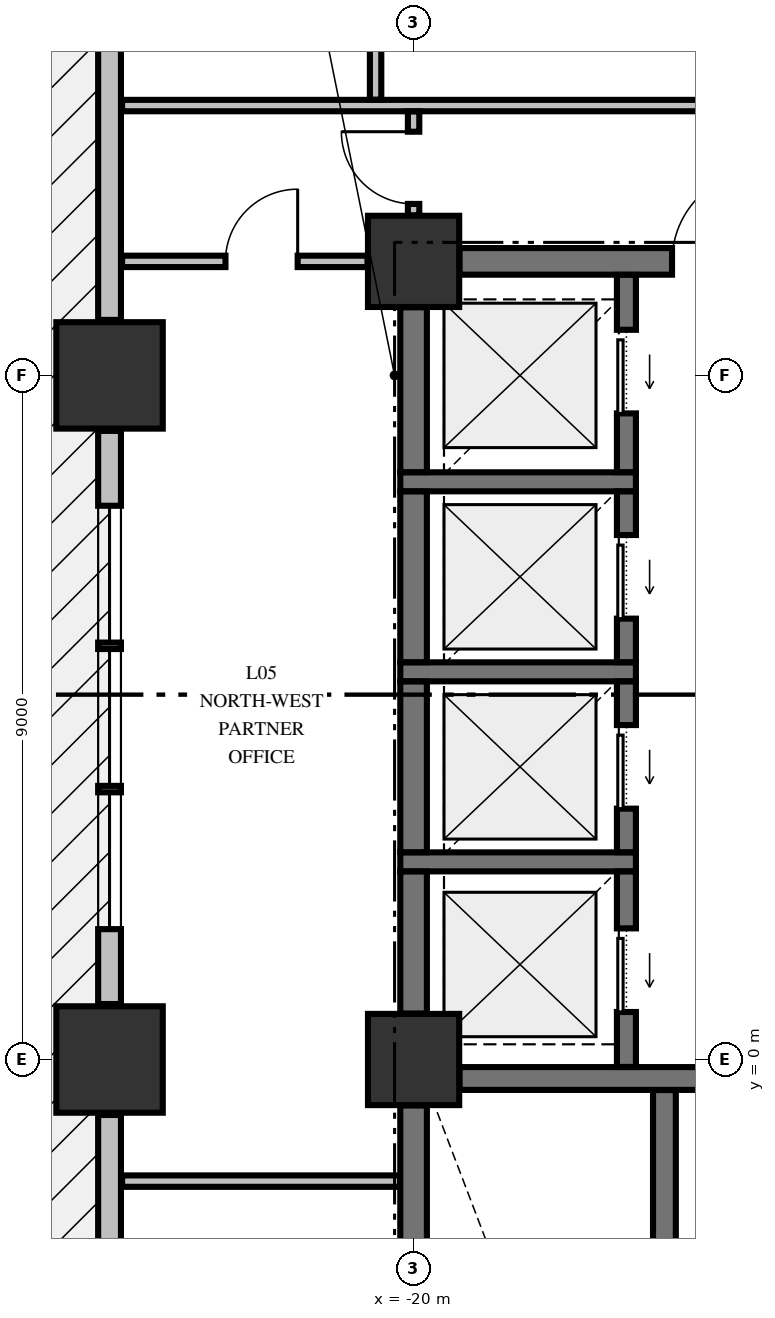
"""IFC4 building model, lengths in metres.
Left out: names, types, materials, properties, quantities, classifications, styles, units other than length and angle.
Written with IfcOpenShell. Run it as: python <this file> out.ifc"""

import sys

from ifc_helpers import new_model, si_unit, direction, frame, frame_2d, origin, origin_2d, place, context, subcontext, project, spatial, rectangle, extrude, element, fill, save


model = new_model("IFC4")
c1 = context("Model", 3, precision=1e-05, world=origin(), true_north=direction((0.0, 1.0)))
c2 = subcontext(c1, "Body", "Model", "MODEL_VIEW")
j1 = project(units=[si_unit("LENGTHUNIT", "METRE"), si_unit("PLANEANGLEUNIT", "RADIAN")], contexts=[c1])
p1 = place(None, origin())
s1 = spatial("IfcSite", under=j1, at=p1, CompositionType="ELEMENT")
p2 = place(p1, origin())
s2 = spatial("IfcBuilding", under=s1, at=p2, CompositionType="ELEMENT")
p3 = place(p2, frame((0.0, 0.0, 27.2)))
s3 = spatial("IfcBuildingStorey", under=s2, at=p3, CompositionType="ELEMENT", Elevation=27.2)
for number, where, z_axis, x_axis in (
    (1, (-24.0, 0.0, -0.45), (0.0, 0.0, 1.0), (1.0, 0.0, 0.0)),
    (2, (-24.0, 9.0, -0.45), (0.0, 0.0, 1.0), (1.0, 0.0, 0.0)),
):
    element("IfcColumn", number, at=place(p3, frame(where, z_axis=z_axis, x_axis=x_axis)), inside=s3, PredefinedType="COLUMN", context=c2, shape_type="SweptSolid", body=[
        extrude(rectangle(XDim=1.4, YDim=1.4, at=origin_2d()), origin(), (0.0, 0.0, 1.0), 3.77),
    ])
for number, where, z_axis, x_axis in (
    (3, (-20.0, 10.5, -0.45), (0.0, 0.0, 1.0), (1.0, 0.0, 0.0)),
    (4, (-20.0, 0.0, -0.45), (0.0, 0.0, 1.0), (1.0, 0.0, 0.0)),
):
    element("IfcColumn", number, at=place(p3, frame(where, z_axis=z_axis, x_axis=x_axis)), inside=s3, PredefinedType="COLUMN", context=c2, shape_type="SweptSolid", body=[
        extrude(rectangle(XDim=1.2, YDim=1.2, at=origin_2d()), origin(), (0.0, 0.0, 1.0), 3.77),
    ])
p4 = place(p3, frame((-24.0, -0.73, 0.0), z_axis=(0.0, 0.0, 1.0), x_axis=(0.0, -1.0, 0.0)))
e5 = element("IfcWall", 5, at=p4, inside=s3, PredefinedType="STANDARD", context=c2, shape_type="SweptSolid", body=[
    extrude(rectangle(XDim=7.54, YDim=0.3, at=frame_2d((3.77, 0.0))), origin(), (0.0, 0.0, 1.0), 2.712),
])
p5 = place(p4, frame((2.87, 0.0, 0.78)))
e6 = element("IfcOpeningElement", 6, at=p5, cuts=e5, PredefinedType="OPENING", context=c2, shape_type="SweptSolid", body=[
    extrude(rectangle(XDim=1.8, YDim=1.72, at=frame_2d((0.9, 0.86))), frame((0.0, 0.16, 0.0), z_axis=(0.0, -1.0, 0.0), x_axis=(1.0, 0.0, 0.0)), (0.0, 0.0, 1.0), 0.32),
])
p6 = place(p4, frame((4.755, 0.0, 0.78)))
e7 = element("IfcOpeningElement", 7, at=p6, cuts=e5, PredefinedType="OPENING", context=c2, shape_type="SweptSolid", body=[
    extrude(rectangle(XDim=1.8, YDim=1.72, at=frame_2d((0.9, 0.86))), frame((0.0, 0.16, 0.0), z_axis=(0.0, -1.0, 0.0), x_axis=(1.0, 0.0, 0.0)), (0.0, 0.0, 1.0), 0.32),
])
p7 = place(p3, frame((-24.0, 8.27, 0.0), z_axis=(0.0, 0.0, 1.0), x_axis=(0.0, -1.0, 0.0)))
e8 = element("IfcWall", 8, at=p7, inside=s3, PredefinedType="STANDARD", context=c2, shape_type="SweptSolid", body=[
    extrude(rectangle(XDim=7.54, YDim=0.3, at=frame_2d((3.77, 0.0))), origin(), (0.0, 0.0, 1.0), 2.712),
])
p8 = place(p7, frame((0.985, 0.0, 0.78)))
e9 = element("IfcOpeningElement", 9, at=p8, cuts=e8, PredefinedType="OPENING", context=c2, shape_type="SweptSolid", body=[
    extrude(rectangle(XDim=1.8, YDim=1.72, at=frame_2d((0.9, 0.86))), frame((0.0, 0.16, 0.0), z_axis=(0.0, -1.0, 0.0), x_axis=(1.0, 0.0, 0.0)), (0.0, 0.0, 1.0), 0.32),
])
p9 = place(p7, frame((2.87, 0.0, 0.78)))
e10 = element("IfcOpeningElement", 10, at=p9, cuts=e8, PredefinedType="OPENING", context=c2, shape_type="SweptSolid", body=[
    extrude(rectangle(XDim=1.8, YDim=1.72, at=frame_2d((0.9, 0.86))), frame((0.0, 0.16, 0.0), z_axis=(0.0, -1.0, 0.0), x_axis=(1.0, 0.0, 0.0)), (0.0, 0.0, 1.0), 0.32),
])
p10 = place(p7, frame((4.755, 0.0, 0.78)))
e11 = element("IfcOpeningElement", 11, at=p10, cuts=e8, PredefinedType="OPENING", context=c2, shape_type="SweptSolid", body=[
    extrude(rectangle(XDim=1.8, YDim=1.72, at=frame_2d((0.9, 0.86))), frame((0.0, 0.16, 0.0), z_axis=(0.0, -1.0, 0.0), x_axis=(1.0, 0.0, 0.0)), (0.0, 0.0, 1.0), 0.32),
])
p11 = place(p3, frame((-24.0, 22.27, 0.0), z_axis=(0.0, 0.0, 1.0), x_axis=(0.0, -1.0, 0.0)))
e12 = element("IfcWall", 12, at=p11, inside=s3, PredefinedType="STANDARD", context=c2, shape_type="SweptSolid", body=[
    extrude(rectangle(XDim=12.54, YDim=0.3, at=frame_2d((6.27, 0.0))), origin(), (0.0, 0.0, 1.0), 2.712),
])
p12 = place(p3, frame((-19.396, -0.25, 0.0), z_axis=(0.0, 0.0, 1.0), x_axis=(1.0, 0.0, 0.0)))
e13 = element("IfcWall", 13, at=p12, inside=s3, PredefinedType="SHEAR", context=c2, shape_type="SweptSolid", body=[
    extrude(rectangle(XDim=7.792, YDim=0.3, at=frame_2d((3.896, 0.0))), origin(), (0.0, 0.0, 1.0), 3.32),
])
p13 = place(p12, frame((5.696, 0.0, 0.0)))
e14 = element("IfcOpeningElement", 14, at=p13, cuts=e13, PredefinedType="OPENING", context=c2, shape_type="SweptSolid", body=[
    extrude(rectangle(XDim=1.1, YDim=2.15, at=frame_2d((0.55, 1.075))), frame((0.0, 0.16, 0.0), z_axis=(0.0, -1.0, 0.0), x_axis=(1.0, 0.0, 0.0)), (0.0, 0.0, 1.0), 0.32),
])
for number, where, z_axis, x_axis in (
    (15, (-20.175, 2.6, 0.0), (0.0, 0.0, 1.0), (1.0, 0.0, 0.0)),
    (16, (-20.175, 5.1, 0.0), (0.0, 0.0, 1.0), (1.0, 0.0, 0.0)),
    (17, (-20.175, 7.6, 0.0), (0.0, 0.0, 1.0), (1.0, 0.0, 0.0)),
):
    element("IfcWall", number, at=place(p3, frame(where, z_axis=z_axis, x_axis=x_axis)), inside=s3, PredefinedType="SOLIDWALL", context=c2, shape_type="SweptSolid", body=[
        extrude(rectangle(XDim=3.1, YDim=0.25, at=frame_2d((1.55, 0.0))), origin(), (0.0, 0.0, 1.0), 3.32),
    ])
p14 = place(p3, frame((-19.396, 10.5, 0.0), z_axis=(0.0, 0.0, 1.0), x_axis=(1.0, 0.0, 0.0)))
e18 = element("IfcWall", 18, at=p14, inside=s3, PredefinedType="SHEAR", context=c2, shape_type="SweptSolid", body=[
    extrude(rectangle(XDim=4.696, YDim=0.35, at=frame_2d((2.348, 0.0))), origin(), (0.0, 0.0, 1.0), 3.32),
])
p15 = place(p14, frame((2.796, 0.0, 0.0)))
e19 = element("IfcOpeningElement", 19, at=p15, cuts=e18, PredefinedType="OPENING", context=c2, shape_type="SweptSolid", body=[
    extrude(rectangle(XDim=1.2, YDim=2.15, at=frame_2d((0.6, 1.075))), frame((0.0, 0.185, 0.0), z_axis=(0.0, -1.0, 0.0), x_axis=(1.0, 0.0, 0.0)), (0.0, 0.0, 1.0), 0.37),
])
p16 = place(p3, frame((-23.835, -1.6, 0.0), z_axis=(0.0, 0.0, 1.0), x_axis=(1.0, 0.0, 0.0)))
e20 = element("IfcWall", 20, at=p16, inside=s3, PredefinedType="PARTITIONING", context=c2, shape_type="SweptSolid", body=[
    extrude(rectangle(XDim=3.657, YDim=0.15, at=frame_2d((1.829, 0.0))), origin(), (0.0, 0.0, 1.0), 3.32),
])
p17 = place(p3, frame((-23.835, 10.5, 0.0), z_axis=(0.0, 0.0, 1.0), x_axis=(1.0, 0.0, 0.0)))
e21 = element("IfcWall", 21, at=p17, inside=s3, PredefinedType="PARTITIONING", context=c2, shape_type="SweptSolid", body=[
    extrude(rectangle(XDim=3.229, YDim=0.15, at=frame_2d((1.615, 0.0))), origin(), (0.0, 0.0, 1.0), 3.32),
])
p18 = place(p17, frame((1.36, 0.0, 0.0)))
e22 = element("IfcOpeningElement", 22, at=p18, cuts=e21, PredefinedType="OPENING", context=c2, shape_type="SweptSolid", body=[
    extrude(rectangle(XDim=0.95, YDim=2.15, at=frame_2d((0.475, 1.075))), frame((0.0, 0.085, 0.0), z_axis=(0.0, -1.0, 0.0), x_axis=(1.0, 0.0, 0.0)), (0.0, 0.0, 1.0), 0.17),
])
p19 = place(p3, frame((-23.835, 12.55, 0.0), z_axis=(0.0, 0.0, 1.0), x_axis=(1.0, 0.0, 0.0)))
e23 = element("IfcWall", 23, at=p19, inside=s3, PredefinedType="PARTITIONING", context=c2, shape_type="SweptSolid", body=[
    extrude(rectangle(XDim=52.67, YDim=0.15, at=frame_2d((26.335, 0.0))), origin(), (0.0, 0.0, 1.0), 3.32),
])
p20 = place(p19, frame((9.16, 0.0, 0.0)))
e24 = element("IfcOpeningElement", 24, at=p20, cuts=e23, PredefinedType="OPENING", context=c2, shape_type="SweptSolid", body=[
    extrude(rectangle(XDim=1.05, YDim=2.15, at=frame_2d((0.525, 1.075))), frame((0.0, 0.085, 0.0), z_axis=(0.0, -1.0, 0.0), x_axis=(1.0, 0.0, 0.0)), (0.0, 0.0, 1.0), 0.17),
])
p21 = place(p19, frame((21.61, 0.0, 0.0)))
e25 = element("IfcOpeningElement", 25, at=p21, cuts=e23, PredefinedType="OPENING", context=c2, shape_type="SweptSolid", body=[
    extrude(rectangle(XDim=1.05, YDim=2.15, at=frame_2d((0.525, 1.075))), frame((0.0, 0.085, 0.0), z_axis=(0.0, -1.0, 0.0), x_axis=(1.0, 0.0, 0.0)), (0.0, 0.0, 1.0), 0.17),
])
p22 = place(p19, frame((30.06, 0.0, 0.0)))
e26 = element("IfcOpeningElement", 26, at=p22, cuts=e23, PredefinedType="OPENING", context=c2, shape_type="SweptSolid", body=[
    extrude(rectangle(XDim=1.05, YDim=2.15, at=frame_2d((0.525, 1.075))), frame((0.0, 0.085, 0.0), z_axis=(0.0, -1.0, 0.0), x_axis=(1.0, 0.0, 0.0)), (0.0, 0.0, 1.0), 0.17),
])
p23 = place(p3, frame((-20.0, -9.346, 0.0), z_axis=(0.0, 0.0, 1.0), x_axis=(0.0, 1.0, 0.0)))
e27 = element("IfcWall", 27, at=p23, inside=s3, PredefinedType="SHEAR", context=c2, shape_type="SweptSolid", body=[
    extrude(rectangle(XDim=8.742, YDim=0.35, at=frame_2d((4.371, 0.0))), origin(), (0.0, 0.0, 1.0), 3.32),
])
p24 = place(p3, frame((-20.0, 0.604, 0.0), z_axis=(0.0, 0.0, 1.0), x_axis=(0.0, 1.0, 0.0)))
e28 = element("IfcWall", 28, at=p24, inside=s3, PredefinedType="SHEAR", context=c2, shape_type="SweptSolid", body=[
    extrude(rectangle(XDim=1.869, YDim=0.35, at=frame_2d((0.935, 0.0))), origin(), (0.0, 0.0, 1.0), 3.32),
])
for number, where, z_axis, x_axis in (
    (29, (-20.0, 2.727, 0.0), (0.0, 0.0, 1.0), (0.0, 1.0, 0.0)),
    (30, (-20.0, 5.227, 0.0), (0.0, 0.0, 1.0), (0.0, 1.0, 0.0)),
):
    element("IfcWall", number, at=place(p3, frame(where, z_axis=z_axis, x_axis=x_axis)), inside=s3, PredefinedType="SHEAR", context=c2, shape_type="SweptSolid", body=[
        extrude(rectangle(XDim=2.246, YDim=0.35, at=frame_2d((1.123, 0.0))), origin(), (0.0, 0.0, 1.0), 3.32),
    ])
p25 = place(p3, frame((-20.0, 7.727, 0.0), z_axis=(0.0, 0.0, 1.0), x_axis=(0.0, 1.0, 0.0)))
e31 = element("IfcWall", 31, at=p25, inside=s3, PredefinedType="SHEAR", context=c2, shape_type="SweptSolid", body=[
    extrude(rectangle(XDim=2.169, YDim=0.35, at=frame_2d((1.084, 0.0))), origin(), (0.0, 0.0, 1.0), 3.32),
])
p26 = place(p3, frame((-17.2, -0.098, 0.0), z_axis=(0.0, 0.0, 1.0), x_axis=(0.0, 1.0, 0.0)))
e32 = element("IfcWall", 32, at=p26, inside=s3, PredefinedType="SOLIDWALL", context=c2, shape_type="SweptSolid", body=[
    extrude(rectangle(XDim=2.571, YDim=0.25, at=frame_2d((1.285, 0.0))), origin(), (0.0, 0.0, 1.0), 3.32),
])
p27 = place(p26, frame((0.723, 0.0, 0.0)))
e33 = element("IfcOpeningElement", 33, at=p27, cuts=e32, PredefinedType="OPENING", context=c2, shape_type="SweptSolid", body=[
    extrude(rectangle(XDim=1.1, YDim=2.2, at=frame_2d((0.55, 1.1))), frame((0.0, 0.135, 0.0), z_axis=(0.0, -1.0, 0.0), x_axis=(1.0, 0.0, 0.0)), (0.0, 0.0, 1.0), 0.27),
])
p28 = place(p3, frame((-17.2, 2.727, 0.0), z_axis=(0.0, 0.0, 1.0), x_axis=(0.0, 1.0, 0.0)))
e34 = element("IfcWall", 34, at=p28, inside=s3, PredefinedType="SOLIDWALL", context=c2, shape_type="SweptSolid", body=[
    extrude(rectangle(XDim=2.246, YDim=0.25, at=frame_2d((1.123, 0.0))), origin(), (0.0, 0.0, 1.0), 3.32),
])
p29 = place(p28, frame((0.573, 0.0, 0.0)))
e35 = element("IfcOpeningElement", 35, at=p29, cuts=e34, PredefinedType="OPENING", context=c2, shape_type="SweptSolid", body=[
    extrude(rectangle(XDim=1.1, YDim=2.2, at=frame_2d((0.55, 1.1))), frame((0.0, 0.135, 0.0), z_axis=(0.0, -1.0, 0.0), x_axis=(1.0, 0.0, 0.0)), (0.0, 0.0, 1.0), 0.27),
])
p30 = place(p3, frame((-17.2, 5.227, 0.0), z_axis=(0.0, 0.0, 1.0), x_axis=(0.0, 1.0, 0.0)))
e36 = element("IfcWall", 36, at=p30, inside=s3, PredefinedType="SOLIDWALL", context=c2, shape_type="SweptSolid", body=[
    extrude(rectangle(XDim=2.246, YDim=0.25, at=frame_2d((1.123, 0.0))), origin(), (0.0, 0.0, 1.0), 3.32),
])
p31 = place(p30, frame((0.573, 0.0, 0.0)))
e37 = element("IfcOpeningElement", 37, at=p31, cuts=e36, PredefinedType="OPENING", context=c2, shape_type="SweptSolid", body=[
    extrude(rectangle(XDim=1.1, YDim=2.2, at=frame_2d((0.55, 1.1))), frame((0.0, 0.135, 0.0), z_axis=(0.0, -1.0, 0.0), x_axis=(1.0, 0.0, 0.0)), (0.0, 0.0, 1.0), 0.27),
])
p32 = place(p3, frame((-17.2, 7.727, 0.0), z_axis=(0.0, 0.0, 1.0), x_axis=(0.0, 1.0, 0.0)))
e38 = element("IfcWall", 38, at=p32, inside=s3, PredefinedType="SOLIDWALL", context=c2, shape_type="SweptSolid", body=[
    extrude(rectangle(XDim=2.596, YDim=0.25, at=frame_2d((1.298, 0.0))), origin(), (0.0, 0.0, 1.0), 3.32),
])
p33 = place(p32, frame((0.773, 0.0, 0.0)))
e39 = element("IfcOpeningElement", 39, at=p33, cuts=e38, PredefinedType="OPENING", context=c2, shape_type="SweptSolid", body=[
    extrude(rectangle(XDim=1.1, YDim=2.2, at=frame_2d((0.55, 1.1))), frame((0.0, 0.135, 0.0), z_axis=(0.0, -1.0, 0.0), x_axis=(1.0, 0.0, 0.0)), (0.0, 0.0, 1.0), 0.27),
])
p34 = place(p3, frame((-16.7, -9.773, 0.0), z_axis=(0.0, 0.0, 1.0), x_axis=(0.0, 1.0, 0.0)))
e40 = element("IfcWall", 40, at=p34, inside=s3, PredefinedType="SHEAR", context=c2, shape_type="SweptSolid", body=[
    extrude(rectangle(XDim=9.371, YDim=0.3, at=frame_2d((4.686, 0.0))), origin(), (0.0, 0.0, 1.0), 3.32),
])
p35 = place(p3, frame((-20.5, 12.628, 0.0), z_axis=(0.0, 0.0, 1.0), x_axis=(0.0, 1.0, 0.0)))
e41 = element("IfcWall", 41, at=p35, inside=s3, PredefinedType="PARTITIONING", context=c2, shape_type="SweptSolid", body=[
    extrude(rectangle(XDim=9.666, YDim=0.15, at=frame_2d((4.833, 0.0))), origin(), (0.0, 0.0, 1.0), 3.32),
])
p36 = place(p3, frame((-20.0, 11.106, 0.0), z_axis=(0.0, 0.0, 1.0), x_axis=(0.0, 1.0, 0.0)))
e42 = element("IfcWall", 42, at=p36, inside=s3, PredefinedType="PARTITIONING", context=c2, shape_type="SweptSolid", body=[
    extrude(rectangle(XDim=1.366, YDim=0.15, at=frame_2d((0.683, 0.0))), origin(), (0.0, 0.0, 1.0), 3.32),
])
p37 = place(p36, frame((0.15, 0.0, 0.0)))
e43 = element("IfcOpeningElement", 43, at=p37, cuts=e42, PredefinedType="OPENING", context=c2, shape_type="SweptSolid", body=[
    extrude(rectangle(XDim=0.95, YDim=2.15, at=frame_2d((0.475, 1.075))), frame((0.0, 0.085, 0.0), z_axis=(0.0, -1.0, 0.0), x_axis=(1.0, 0.0, 0.0)), (0.0, 0.0, 1.0), 0.17),
])
p38 = place(p8, origin())
e44 = element("IfcWindow", 44, at=p38, inside=s3, PartitioningType="SINGLE_PANEL", PredefinedType="WINDOW", context=c2, shape_type="SweptSolid", body=[
    extrude(rectangle(XDim=1.8, YDim=1.72, at=frame_2d((0.9, 0.86))), frame((0.0, 0.03, 0.0), z_axis=(0.0, -1.0, 0.0), x_axis=(1.0, 0.0, 0.0)), (0.0, 0.0, 1.0), 0.06),
])
fill(e9, e44)
p39 = place(p9, origin())
e45 = element("IfcWindow", 45, at=p39, inside=s3, PartitioningType="SINGLE_PANEL", PredefinedType="WINDOW", context=c2, shape_type="SweptSolid", body=[
    extrude(rectangle(XDim=1.8, YDim=1.72, at=frame_2d((0.9, 0.86))), frame((0.0, 0.03, 0.0), z_axis=(0.0, -1.0, 0.0), x_axis=(1.0, 0.0, 0.0)), (0.0, 0.0, 1.0), 0.06),
])
fill(e10, e45)
p40 = place(p10, origin())
e46 = element("IfcWindow", 46, at=p40, inside=s3, PartitioningType="SINGLE_PANEL", PredefinedType="WINDOW", context=c2, shape_type="SweptSolid", body=[
    extrude(rectangle(XDim=1.8, YDim=1.72, at=frame_2d((0.9, 0.86))), frame((0.0, 0.03, 0.0), z_axis=(0.0, -1.0, 0.0), x_axis=(1.0, 0.0, 0.0)), (0.0, 0.0, 1.0), 0.06),
])
fill(e11, e46)
p41 = place(p15, origin())
e47 = element("IfcDoor", 47, at=p41, inside=s3, OperationType="SINGLE_SWING_RIGHT", PredefinedType="DOOR", context=c2, shape_type="SweptSolid", body=[
    extrude(rectangle(XDim=1.2, YDim=2.15, at=frame_2d((0.6, 1.075))), frame((0.0, 0.025, 0.0), z_axis=(0.0, -1.0, 0.0), x_axis=(1.0, 0.0, 0.0)), (0.0, 0.0, 1.0), 0.05),
])
fill(e19, e47)
p42 = place(p27, origin())
e48 = element("IfcDoor", 48, at=p42, inside=s3, OperationType="SLIDING_TO_LEFT", PredefinedType="DOOR", context=c2, shape_type="SweptSolid", body=[
    extrude(rectangle(XDim=1.1, YDim=2.2, at=frame_2d((0.55, 1.1))), frame((0.0, 0.025, 0.0), z_axis=(0.0, -1.0, 0.0), x_axis=(1.0, 0.0, 0.0)), (0.0, 0.0, 1.0), 0.05),
])
fill(e33, e48)
p43 = place(p29, origin())
e49 = element("IfcDoor", 49, at=p43, inside=s3, OperationType="SLIDING_TO_LEFT", PredefinedType="DOOR", context=c2, shape_type="SweptSolid", body=[
    extrude(rectangle(XDim=1.1, YDim=2.2, at=frame_2d((0.55, 1.1))), frame((0.0, 0.025, 0.0), z_axis=(0.0, -1.0, 0.0), x_axis=(1.0, 0.0, 0.0)), (0.0, 0.0, 1.0), 0.05),
])
fill(e35, e49)
p44 = place(p31, origin())
e50 = element("IfcDoor", 50, at=p44, inside=s3, OperationType="SLIDING_TO_LEFT", PredefinedType="DOOR", context=c2, shape_type="SweptSolid", body=[
    extrude(rectangle(XDim=1.1, YDim=2.2, at=frame_2d((0.55, 1.1))), frame((0.0, 0.025, 0.0), z_axis=(0.0, -1.0, 0.0), x_axis=(1.0, 0.0, 0.0)), (0.0, 0.0, 1.0), 0.05),
])
fill(e37, e50)
p45 = place(p33, origin())
e51 = element("IfcDoor", 51, at=p45, inside=s3, OperationType="SLIDING_TO_LEFT", PredefinedType="DOOR", context=c2, shape_type="SweptSolid", body=[
    extrude(rectangle(XDim=1.1, YDim=2.2, at=frame_2d((0.55, 1.1))), frame((0.0, 0.025, 0.0), z_axis=(0.0, -1.0, 0.0), x_axis=(1.0, 0.0, 0.0)), (0.0, 0.0, 1.0), 0.05),
])
fill(e39, e51)
p46 = place(p37, origin())
e52 = element("IfcDoor", 52, at=p46, inside=s3, OperationType="SINGLE_SWING_RIGHT", PredefinedType="DOOR", context=c2, shape_type="SweptSolid", body=[
    extrude(rectangle(XDim=0.95, YDim=2.15, at=frame_2d((0.475, 1.075))), frame((0.0, 0.025, 0.0), z_axis=(0.0, -1.0, 0.0), x_axis=(1.0, 0.0, 0.0)), (0.0, 0.0, 1.0), 0.05),
])
fill(e43, e52)
p47 = place(p18, origin())
e53 = element("IfcDoor", 53, at=p47, inside=s3, OperationType="SINGLE_SWING_RIGHT", PredefinedType="DOOR", context=c2, shape_type="SweptSolid", body=[
    extrude(rectangle(XDim=0.95, YDim=2.15, at=frame_2d((0.475, 1.075))), frame((0.0, 0.025, 0.0), z_axis=(0.0, -1.0, 0.0), x_axis=(1.0, 0.0, 0.0)), (0.0, 0.0, 1.0), 0.05),
])
fill(e22, e53)
save(model, sys.argv[1])
